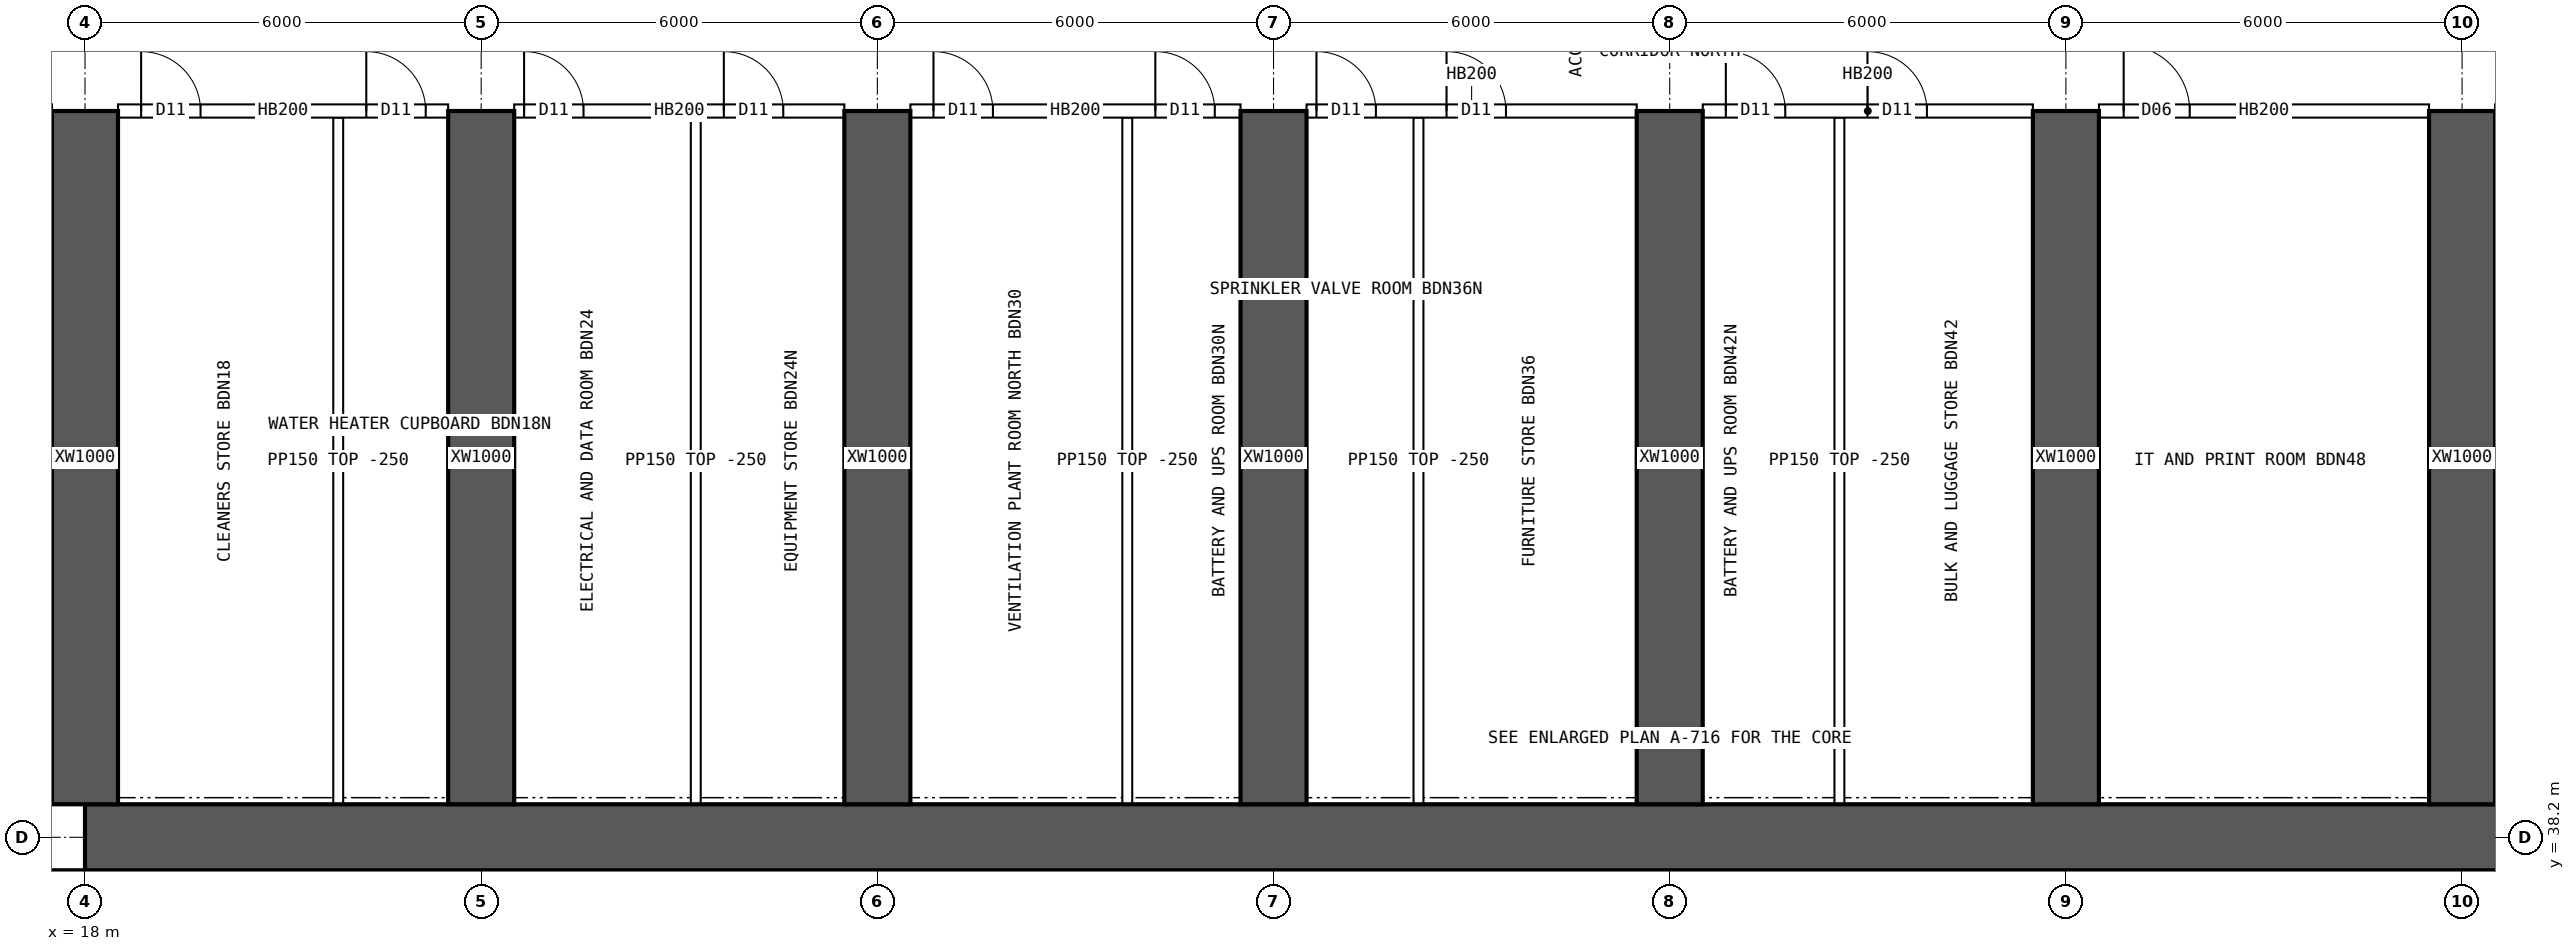
"""IFC4 building model, lengths in metres.
Left out: names, types, materials, properties, quantities, classifications, styles, units other than length and angle.
Written with IfcOpenShell. Run it as: python <this file> out.ifc"""

import sys

from ifc_helpers import new_model, si_unit, direction, frame, frame_2d, origin, place, context, subcontext, project, spatial, rectangle, extrude, element, fill, save


model = new_model("IFC4")
c1 = context("Model", 3, precision=1e-05, world=origin(), true_north=direction((0.0, 1.0)))
c2 = subcontext(c1, "Body", "Model", "MODEL_VIEW")
j1 = project(units=[si_unit("LENGTHUNIT", "METRE"), si_unit("PLANEANGLEUNIT", "RADIAN")], contexts=[c1])
p1 = place(None, origin())
s1 = spatial("IfcSite", under=j1, at=p1, CompositionType="ELEMENT")
p2 = place(p1, origin())
s2 = spatial("IfcBuilding", under=s1, at=p2, CompositionType="ELEMENT")
p3 = place(p2, frame((0.0, 0.0, 53.95)))
s3 = spatial("IfcBuildingStorey", under=s2, at=p3, CompositionType="ELEMENT", Elevation=53.95)
p4 = place(p3, frame((18.0, 38.2, 0.0), z_axis=(0.0, 0.0, 1.0), x_axis=(1.0, 0.0, 0.0)))
e1 = element("IfcWall", 1, at=p4, inside=s3, PredefinedType="SHEAR", context=c2, shape_type="SweptSolid", body=[
    extrude(rectangle(XDim=48.0, YDim=1.0, at=frame_2d((24.0, 0.0))), origin(), (0.0, 0.0, 1.0), 3.75),
])
for number, where, z_axis, x_axis in (
    (2, (21.6, 34.75, 0.0), (0.0, 0.0, 1.0), (0.0, 1.0, 0.0)),
    (3, (26.0, 34.75, 0.0), (0.0, 0.0, 1.0), (0.0, 1.0, 0.0)),
):
    element("IfcWall", number, at=place(p3, frame(where, z_axis=z_axis, x_axis=x_axis)), inside=s3, PredefinedType="SHEAR", context=c2, shape_type="SweptSolid", body=[
        extrude(rectangle(XDim=2.95, YDim=0.3, at=frame_2d((1.475, 0.0))), origin(), (0.0, 0.0, 1.0), 3.75),
    ])
for number, where, z_axis, x_axis in (
    (4, (18.0, 38.7, 0.0), (0.0, 0.0, 1.0), (0.0, 1.0, 0.0)),
    (5, (24.0, 38.7, 0.0), (0.0, 0.0, 1.0), (0.0, 1.0, 0.0)),
    (6, (30.0, 38.7, 0.0), (0.0, 0.0, 1.0), (0.0, 1.0, 0.0)),
    (7, (36.0, 38.7, 0.0), (0.0, 0.0, 1.0), (0.0, 1.0, 0.0)),
    (8, (42.0, 38.7, 0.0), (0.0, 0.0, 1.0), (0.0, 1.0, 0.0)),
    (9, (48.0, 38.7, 0.0), (0.0, 0.0, 1.0), (0.0, 1.0, 0.0)),
    (10, (54.0, 38.7, 0.0), (0.0, 0.0, 1.0), (0.0, 1.0, 0.0)),
):
    element("IfcWall", number, at=place(p3, frame(where, z_axis=z_axis, x_axis=x_axis)), inside=s3, PredefinedType="SHEAR", context=c2, shape_type="SweptSolid", body=[
        extrude(rectangle(XDim=10.5, YDim=1.0, at=frame_2d((5.25, 0.0))), origin(), (0.0, 0.0, 1.0), 3.75),
    ])
for number, where, z_axis, x_axis in (
    (11, (29.651, 34.75, 0.0), (0.0, 0.0, 1.0), (0.0, 1.0, 0.0)),
    (12, (33.946, 34.75, 0.0), (0.0, 0.0, 1.0), (0.0, 1.0, 0.0)),
    (13, (36.946, 34.75, 0.0), (0.0, 0.0, 1.0), (0.0, 1.0, 0.0)),
    (14, (41.463, 34.75, 0.0), (0.0, 0.0, 1.0), (0.0, 1.0, 0.0)),
    (15, (45.758, 34.75, 0.0), (0.0, 0.0, 1.0), (0.0, 1.0, 0.0)),
    (16, (47.058, 34.75, 0.0), (0.0, 0.0, 1.0), (0.0, 1.0, 0.0)),
    (17, (50.098, 34.75, 0.0), (0.0, 0.0, 1.0), (0.0, 1.0, 0.0)),
):
    element("IfcWall", number, at=place(p3, frame(where, z_axis=z_axis, x_axis=x_axis)), inside=s3, PredefinedType="SOLIDWALL", context=c2, shape_type="SweptSolid", body=[
        extrude(rectangle(XDim=2.95, YDim=0.15, at=frame_2d((1.475, 0.0))), origin(), (0.0, 0.0, 1.0), 3.5),
    ])
p5 = place(p3, frame((18.5, 49.2, 0.0), z_axis=(0.0, 0.0, 1.0), x_axis=(1.0, 0.0, 0.0)))
e18 = element("IfcWall", 18, at=p5, inside=s3, PredefinedType="SOLIDWALL", context=c2, shape_type="SweptSolid", body=[
    extrude(rectangle(XDim=5.0, YDim=0.2, at=frame_2d((2.5, 0.0))), origin(), (0.0, 0.0, 1.0), 3.5),
])
p6 = place(p5, frame((0.35, 0.0, 0.0)))
e19 = element("IfcOpeningElement", 19, at=p6, cuts=e18, PredefinedType="OPENING", context=c2, shape_type="SweptSolid", body=[
    extrude(rectangle(XDim=0.9, YDim=2.1, at=frame_2d((0.45, 1.05))), frame((0.0, 0.11, 0.0), z_axis=(0.0, -1.0, 0.0), x_axis=(1.0, 0.0, 0.0)), (0.0, 0.0, 1.0), 0.22),
])
p7 = place(p5, frame((3.76, 0.0, 0.0)))
e20 = element("IfcOpeningElement", 20, at=p7, cuts=e18, PredefinedType="OPENING", context=c2, shape_type="SweptSolid", body=[
    extrude(rectangle(XDim=0.9, YDim=2.1, at=frame_2d((0.45, 1.05))), frame((0.0, 0.11, 0.0), z_axis=(0.0, -1.0, 0.0), x_axis=(1.0, 0.0, 0.0)), (0.0, 0.0, 1.0), 0.22),
])
p8 = place(p3, frame((24.5, 49.2, 0.0), z_axis=(0.0, 0.0, 1.0), x_axis=(1.0, 0.0, 0.0)))
e21 = element("IfcWall", 21, at=p8, inside=s3, PredefinedType="SOLIDWALL", context=c2, shape_type="SweptSolid", body=[
    extrude(rectangle(XDim=5.0, YDim=0.2, at=frame_2d((2.5, 0.0))), origin(), (0.0, 0.0, 1.0), 3.5),
])
p9 = place(p8, frame((0.15, 0.0, 0.0)))
e22 = element("IfcOpeningElement", 22, at=p9, cuts=e21, PredefinedType="OPENING", context=c2, shape_type="SweptSolid", body=[
    extrude(rectangle(XDim=0.9, YDim=2.1, at=frame_2d((0.45, 1.05))), frame((0.0, 0.11, 0.0), z_axis=(0.0, -1.0, 0.0), x_axis=(1.0, 0.0, 0.0)), (0.0, 0.0, 1.0), 0.22),
])
p10 = place(p8, frame((3.175, 0.0, 0.0)))
e23 = element("IfcOpeningElement", 23, at=p10, cuts=e21, PredefinedType="OPENING", context=c2, shape_type="SweptSolid", body=[
    extrude(rectangle(XDim=0.9, YDim=2.1, at=frame_2d((0.45, 1.05))), frame((0.0, 0.11, 0.0), z_axis=(0.0, -1.0, 0.0), x_axis=(1.0, 0.0, 0.0)), (0.0, 0.0, 1.0), 0.22),
])
p11 = place(p3, frame((30.5, 49.2, 0.0), z_axis=(0.0, 0.0, 1.0), x_axis=(1.0, 0.0, 0.0)))
e24 = element("IfcWall", 24, at=p11, inside=s3, PredefinedType="SOLIDWALL", context=c2, shape_type="SweptSolid", body=[
    extrude(rectangle(XDim=5.0, YDim=0.2, at=frame_2d((2.5, 0.0))), origin(), (0.0, 0.0, 1.0), 3.5),
])
p12 = place(p11, frame((0.35, 0.0, 0.0)))
e25 = element("IfcOpeningElement", 25, at=p12, cuts=e24, PredefinedType="OPENING", context=c2, shape_type="SweptSolid", body=[
    extrude(rectangle(XDim=0.9, YDim=2.1, at=frame_2d((0.45, 1.05))), frame((0.0, 0.11, 0.0), z_axis=(0.0, -1.0, 0.0), x_axis=(1.0, 0.0, 0.0)), (0.0, 0.0, 1.0), 0.22),
])
p13 = place(p11, frame((3.71, 0.0, 0.0)))
e26 = element("IfcOpeningElement", 26, at=p13, cuts=e24, PredefinedType="OPENING", context=c2, shape_type="SweptSolid", body=[
    extrude(rectangle(XDim=0.9, YDim=2.1, at=frame_2d((0.45, 1.05))), frame((0.0, 0.11, 0.0), z_axis=(0.0, -1.0, 0.0), x_axis=(1.0, 0.0, 0.0)), (0.0, 0.0, 1.0), 0.22),
])
p14 = place(p3, frame((36.5, 49.2, 0.0), z_axis=(0.0, 0.0, 1.0), x_axis=(1.0, 0.0, 0.0)))
e27 = element("IfcWall", 27, at=p14, inside=s3, PredefinedType="SOLIDWALL", context=c2, shape_type="SweptSolid", body=[
    extrude(rectangle(XDim=5.0, YDim=0.2, at=frame_2d((2.5, 0.0))), origin(), (0.0, 0.0, 1.0), 3.5),
])
p15 = place(p14, frame((0.15, 0.0, 0.0)))
e28 = element("IfcOpeningElement", 28, at=p15, cuts=e27, PredefinedType="OPENING", context=c2, shape_type="SweptSolid", body=[
    extrude(rectangle(XDim=0.9, YDim=2.1, at=frame_2d((0.45, 1.05))), frame((0.0, 0.11, 0.0), z_axis=(0.0, -1.0, 0.0), x_axis=(1.0, 0.0, 0.0)), (0.0, 0.0, 1.0), 0.22),
])
p16 = place(p14, frame((2.12, 0.0, 0.0)))
e29 = element("IfcOpeningElement", 29, at=p16, cuts=e27, PredefinedType="OPENING", context=c2, shape_type="SweptSolid", body=[
    extrude(rectangle(XDim=0.9, YDim=2.1, at=frame_2d((0.45, 1.05))), frame((0.0, 0.11, 0.0), z_axis=(0.0, -1.0, 0.0), x_axis=(1.0, 0.0, 0.0)), (0.0, 0.0, 1.0), 0.22),
])
p17 = place(p3, frame((42.5, 49.2, 0.0), z_axis=(0.0, 0.0, 1.0), x_axis=(1.0, 0.0, 0.0)))
e30 = element("IfcWall", 30, at=p17, inside=s3, PredefinedType="SOLIDWALL", context=c2, shape_type="SweptSolid", body=[
    extrude(rectangle(XDim=5.0, YDim=0.2, at=frame_2d((2.5, 0.0))), origin(), (0.0, 0.0, 1.0), 3.5),
])
p18 = place(p17, frame((0.35, 0.0, 0.0)))
e31 = element("IfcOpeningElement", 31, at=p18, cuts=e30, PredefinedType="OPENING", context=c2, shape_type="SweptSolid", body=[
    extrude(rectangle(XDim=0.9, YDim=2.1, at=frame_2d((0.45, 1.05))), frame((0.0, 0.11, 0.0), z_axis=(0.0, -1.0, 0.0), x_axis=(1.0, 0.0, 0.0)), (0.0, 0.0, 1.0), 0.22),
])
p19 = place(p17, frame((2.495, 0.0, 0.0)))
e32 = element("IfcOpeningElement", 32, at=p19, cuts=e30, PredefinedType="OPENING", context=c2, shape_type="SweptSolid", body=[
    extrude(rectangle(XDim=0.9, YDim=2.1, at=frame_2d((0.45, 1.05))), frame((0.0, 0.11, 0.0), z_axis=(0.0, -1.0, 0.0), x_axis=(1.0, 0.0, 0.0)), (0.0, 0.0, 1.0), 0.22),
])
p20 = place(p3, frame((48.5, 49.2, 0.0), z_axis=(0.0, 0.0, 1.0), x_axis=(1.0, 0.0, 0.0)))
e33 = element("IfcWall", 33, at=p20, inside=s3, PredefinedType="SOLIDWALL", context=c2, shape_type="SweptSolid", body=[
    extrude(rectangle(XDim=5.0, YDim=0.2, at=frame_2d((2.5, 0.0))), origin(), (0.0, 0.0, 1.0), 3.5),
])
p21 = place(p20, frame((0.375, 0.0, 0.0)))
e34 = element("IfcOpeningElement", 34, at=p21, cuts=e33, PredefinedType="OPENING", context=c2, shape_type="SweptSolid", body=[
    extrude(rectangle(XDim=1.0, YDim=2.1, at=frame_2d((0.5, 1.05))), frame((0.0, 0.11, 0.0), z_axis=(0.0, -1.0, 0.0), x_axis=(1.0, 0.0, 0.0)), (0.0, 0.0, 1.0), 0.22),
])
for number, where, z_axis, x_axis in (
    (35, (21.835, 38.7, 0.0), (0.0, 0.0, 1.0), (0.0, 1.0, 0.0)),
    (36, (27.25, 38.7, 0.0), (0.0, 0.0, 1.0), (0.0, 1.0, 0.0)),
    (37, (33.785, 38.7, 0.0), (0.0, 0.0, 1.0), (0.0, 1.0, 0.0)),
    (38, (38.195, 38.7, 0.0), (0.0, 0.0, 1.0), (0.0, 1.0, 0.0)),
    (39, (44.57, 38.7, 0.0), (0.0, 0.0, 1.0), (0.0, 1.0, 0.0)),
):
    element("IfcWall", number, at=place(p3, frame(where, z_axis=z_axis, x_axis=x_axis)), inside=s3, PredefinedType="PARTITIONING", context=c2, shape_type="SweptSolid", body=[
        extrude(rectangle(XDim=10.4, YDim=0.15, at=frame_2d((5.2, 0.0))), origin(), (0.0, 0.0, 1.0), 3.5),
    ])
p22 = place(p6, origin())
e40 = element("IfcDoor", 40, at=p22, inside=s3, OperationType="SINGLE_SWING_LEFT", PredefinedType="DOOR", context=c2, shape_type="SweptSolid", body=[
    extrude(rectangle(XDim=0.9, YDim=2.1, at=frame_2d((0.45, 1.05))), frame((0.0, 0.025, 0.0), z_axis=(0.0, -1.0, 0.0), x_axis=(1.0, 0.0, 0.0)), (0.0, 0.0, 1.0), 0.05),
])
fill(e19, e40)
p23 = place(p7, origin())
e41 = element("IfcDoor", 41, at=p23, inside=s3, OperationType="SINGLE_SWING_LEFT", PredefinedType="DOOR", context=c2, shape_type="SweptSolid", body=[
    extrude(rectangle(XDim=0.9, YDim=2.1, at=frame_2d((0.45, 1.05))), frame((0.0, 0.025, 0.0), z_axis=(0.0, -1.0, 0.0), x_axis=(1.0, 0.0, 0.0)), (0.0, 0.0, 1.0), 0.05),
])
fill(e20, e41)
p24 = place(p9, origin())
e42 = element("IfcDoor", 42, at=p24, inside=s3, OperationType="SINGLE_SWING_LEFT", PredefinedType="DOOR", context=c2, shape_type="SweptSolid", body=[
    extrude(rectangle(XDim=0.9, YDim=2.1, at=frame_2d((0.45, 1.05))), frame((0.0, 0.025, 0.0), z_axis=(0.0, -1.0, 0.0), x_axis=(1.0, 0.0, 0.0)), (0.0, 0.0, 1.0), 0.05),
])
fill(e22, e42)
p25 = place(p10, origin())
e43 = element("IfcDoor", 43, at=p25, inside=s3, OperationType="SINGLE_SWING_LEFT", PredefinedType="DOOR", context=c2, shape_type="SweptSolid", body=[
    extrude(rectangle(XDim=0.9, YDim=2.1, at=frame_2d((0.45, 1.05))), frame((0.0, 0.025, 0.0), z_axis=(0.0, -1.0, 0.0), x_axis=(1.0, 0.0, 0.0)), (0.0, 0.0, 1.0), 0.05),
])
fill(e23, e43)
p26 = place(p12, origin())
e44 = element("IfcDoor", 44, at=p26, inside=s3, OperationType="SINGLE_SWING_LEFT", PredefinedType="DOOR", context=c2, shape_type="SweptSolid", body=[
    extrude(rectangle(XDim=0.9, YDim=2.1, at=frame_2d((0.45, 1.05))), frame((0.0, 0.025, 0.0), z_axis=(0.0, -1.0, 0.0), x_axis=(1.0, 0.0, 0.0)), (0.0, 0.0, 1.0), 0.05),
])
fill(e25, e44)
p27 = place(p13, origin())
e45 = element("IfcDoor", 45, at=p27, inside=s3, OperationType="SINGLE_SWING_LEFT", PredefinedType="DOOR", context=c2, shape_type="SweptSolid", body=[
    extrude(rectangle(XDim=0.9, YDim=2.1, at=frame_2d((0.45, 1.05))), frame((0.0, 0.025, 0.0), z_axis=(0.0, -1.0, 0.0), x_axis=(1.0, 0.0, 0.0)), (0.0, 0.0, 1.0), 0.05),
])
fill(e26, e45)
p28 = place(p15, origin())
e46 = element("IfcDoor", 46, at=p28, inside=s3, OperationType="SINGLE_SWING_LEFT", PredefinedType="DOOR", context=c2, shape_type="SweptSolid", body=[
    extrude(rectangle(XDim=0.9, YDim=2.1, at=frame_2d((0.45, 1.05))), frame((0.0, 0.025, 0.0), z_axis=(0.0, -1.0, 0.0), x_axis=(1.0, 0.0, 0.0)), (0.0, 0.0, 1.0), 0.05),
])
fill(e28, e46)
p29 = place(p16, origin())
e47 = element("IfcDoor", 47, at=p29, inside=s3, OperationType="SINGLE_SWING_LEFT", PredefinedType="DOOR", context=c2, shape_type="SweptSolid", body=[
    extrude(rectangle(XDim=0.9, YDim=2.1, at=frame_2d((0.45, 1.05))), frame((0.0, 0.025, 0.0), z_axis=(0.0, -1.0, 0.0), x_axis=(1.0, 0.0, 0.0)), (0.0, 0.0, 1.0), 0.05),
])
fill(e29, e47)
p30 = place(p18, origin())
e48 = element("IfcDoor", 48, at=p30, inside=s3, OperationType="SINGLE_SWING_LEFT", PredefinedType="DOOR", context=c2, shape_type="SweptSolid", body=[
    extrude(rectangle(XDim=0.9, YDim=2.1, at=frame_2d((0.45, 1.05))), frame((0.0, 0.025, 0.0), z_axis=(0.0, -1.0, 0.0), x_axis=(1.0, 0.0, 0.0)), (0.0, 0.0, 1.0), 0.05),
])
fill(e31, e48)
p31 = place(p19, origin())
e49 = element("IfcDoor", 49, at=p31, inside=s3, OperationType="SINGLE_SWING_LEFT", PredefinedType="DOOR", context=c2, shape_type="SweptSolid", body=[
    extrude(rectangle(XDim=0.9, YDim=2.1, at=frame_2d((0.45, 1.05))), frame((0.0, 0.025, 0.0), z_axis=(0.0, -1.0, 0.0), x_axis=(1.0, 0.0, 0.0)), (0.0, 0.0, 1.0), 0.05),
])
fill(e32, e49)
p32 = place(p21, origin())
e50 = element("IfcDoor", 50, at=p32, inside=s3, OperationType="SINGLE_SWING_LEFT", PredefinedType="DOOR", context=c2, shape_type="SweptSolid", body=[
    extrude(rectangle(XDim=1.0, YDim=2.1, at=frame_2d((0.5, 1.05))), frame((0.0, 0.025, 0.0), z_axis=(0.0, -1.0, 0.0), x_axis=(1.0, 0.0, 0.0)), (0.0, 0.0, 1.0), 0.05),
])
fill(e34, e50)
save(model, sys.argv[1])
